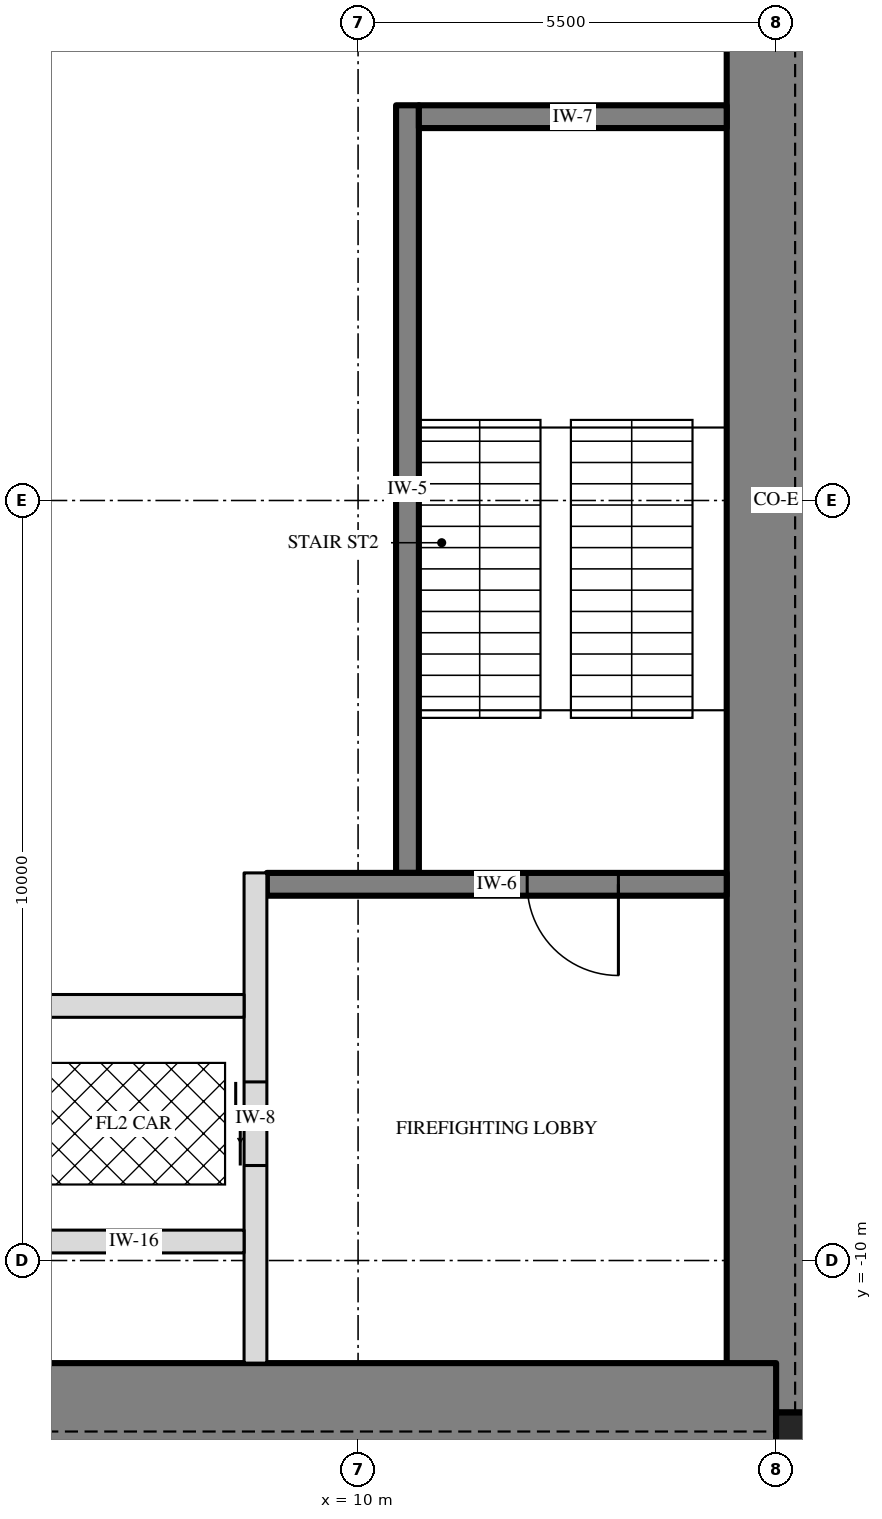
"""IFC4 building model, lengths in metres.
Left out: names, types, materials, properties, quantities, classifications, styles, units other than length and angle.
Written with IfcOpenShell. Run it as: python <this file> out.ifc"""

import sys

from ifc_helpers import new_model, si_unit, direction, frame, frame_2d, origin, origin_2d, place, context, subcontext, project, spatial, rectangle, extrude, element, fill, save


model = new_model("IFC4")
c1 = context("Model", 3, precision=1e-05, world=origin(), true_north=direction((0.0, 1.0)))
c2 = subcontext(c1, "Body", "Model", "MODEL_VIEW")
j1 = project(units=[si_unit("LENGTHUNIT", "METRE"), si_unit("PLANEANGLEUNIT", "RADIAN")], contexts=[c1])
p1 = place(None, origin())
s1 = spatial("IfcSite", under=j1, at=p1, CompositionType="ELEMENT")
p2 = place(p1, origin())
s2 = spatial("IfcBuilding", under=s1, at=p2, CompositionType="ELEMENT")
p3 = place(p2, frame((0.0, 0.0, 353.25)))
s3 = spatial("IfcBuildingStorey", under=s2, at=p3, CompositionType="ELEMENT", Elevation=353.25)
p4 = place(p3, frame((15.5, -12.0, -0.3), z_axis=(0.0, 0.0, 1.0), x_axis=(0.0, 1.0, 0.0)))
e1 = element("IfcWall", 1, at=p4, inside=s3, PredefinedType="SHEAR", context=c2, shape_type="SweptSolid", body=[
    extrude(rectangle(XDim=24.0, YDim=1.3, at=frame_2d((12.0, 0.0))), origin(), (0.0, 0.0, 1.0), 5.0),
])
p5 = place(p4, frame((2.675, 0.0, 0.3)))
e2 = element("IfcOpeningElement", 2, at=p5, cuts=e1, PredefinedType="OPENING", context=c2, shape_type="SweptSolid", body=[
    extrude(rectangle(XDim=1.2, YDim=2.1, at=frame_2d((0.6, 1.05))), frame((0.0, 0.66, 0.0), z_axis=(0.0, -1.0, 0.0), x_axis=(1.0, 0.0, 0.0)), (0.0, 0.0, 1.0), 1.32),
])
p6 = place(p4, frame((20.125, 0.0, 0.3)))
e3 = element("IfcOpeningElement", 3, at=p6, cuts=e1, PredefinedType="OPENING", context=c2, shape_type="SweptSolid", body=[
    extrude(rectangle(XDim=1.8, YDim=2.1, at=frame_2d((0.9, 1.05))), frame((0.0, 0.66, 0.0), z_axis=(0.0, -1.0, 0.0), x_axis=(1.0, 0.0, 0.0)), (0.0, 0.0, 1.0), 1.32),
])
p7 = place(p3, frame((-15.5, -12.0, -0.3), z_axis=(0.0, 0.0, 1.0), x_axis=(1.0, 0.0, 0.0)))
e4 = element("IfcWall", 4, at=p7, inside=s3, PredefinedType="SHEAR", context=c2, shape_type="SweptSolid", body=[
    extrude(rectangle(XDim=31.0, YDim=1.3, at=frame_2d((15.5, 0.0))), origin(), (0.0, 0.0, 1.0), 5.0),
])
p8 = place(p3, frame((15.825, -12.325, -0.3), z_axis=(0.0, 0.0, 1.0), x_axis=(1.0, 0.0, 0.0)))
e5 = element("IfcColumn", 5, at=p8, inside=s3, PredefinedType="COLUMN", context=c2, shape_type="SweptSolid", body=[
    extrude(rectangle(XDim=0.65, YDim=0.65, at=origin_2d()), origin(), (0.0, 0.0, 1.0), 5.0),
])
p9 = place(p3, frame((10.65, -4.9, 0.0), z_axis=(0.0, 0.0, 1.0), x_axis=(0.0, 1.0, 0.0)))
e6 = element("IfcWall", 6, at=p9, inside=s3, PredefinedType="SOLIDWALL", context=c2, shape_type="SweptSolid", body=[
    extrude(rectangle(XDim=10.1, YDim=0.3, at=frame_2d((5.05, 0.0))), origin(), (0.0, 0.0, 1.0), 4.7),
])
p10 = place(p3, frame((14.85, -5.05, 0.0), z_axis=(0.0, 0.0, 1.0), x_axis=(-1.0, 0.0, 0.0)))
e7 = element("IfcWall", 7, at=p10, inside=s3, PredefinedType="SOLIDWALL", context=c2, shape_type="SweptSolid", body=[
    extrude(rectangle(XDim=6.05, YDim=0.3, at=frame_2d((3.025, 0.0))), origin(), (0.0, 0.0, 1.0), 4.7),
])
p11 = place(p10, frame((1.425, 0.0, 0.0)))
e8 = element("IfcOpeningElement", 8, at=p11, cuts=e7, PredefinedType="OPENING", context=c2, shape_type="SweptSolid", body=[
    extrude(rectangle(XDim=1.2, YDim=2.1, at=frame_2d((0.6, 1.05))), frame((0.0, 0.16, 0.0), z_axis=(0.0, -1.0, 0.0), x_axis=(1.0, 0.0, 0.0)), (0.0, 0.0, 1.0), 0.32),
])
p12 = place(p3, frame((14.85, 5.05, 0.0), z_axis=(0.0, 0.0, 1.0), x_axis=(-1.0, 0.0, 0.0)))
e9 = element("IfcWall", 9, at=p12, inside=s3, PredefinedType="SOLIDWALL", context=c2, shape_type="SweptSolid", body=[
    extrude(rectangle(XDim=4.05, YDim=0.3, at=frame_2d((2.025, 0.0))), origin(), (0.0, 0.0, 1.0), 4.7),
])
p13 = place(p3, frame((8.65, -11.35, 0.0), z_axis=(0.0, 0.0, 1.0), x_axis=(0.0, 1.0, 0.0)))
e10 = element("IfcWall", 10, at=p13, inside=s3, PredefinedType="PARTITIONING", context=c2, shape_type="SweptSolid", body=[
    extrude(rectangle(XDim=6.45, YDim=0.3, at=frame_2d((3.225, 0.0))), origin(), (0.0, 0.0, 1.0), 4.7),
])
p14 = place(p13, frame((2.6, 0.0, 0.0)))
e11 = element("IfcOpeningElement", 11, at=p14, cuts=e10, PredefinedType="OPENING", context=c2, shape_type="SweptSolid", body=[
    extrude(rectangle(XDim=1.1, YDim=2.1, at=frame_2d((0.55, 1.05))), frame((0.0, 0.16, 0.0), z_axis=(0.0, -1.0, 0.0), x_axis=(1.0, 0.0, 0.0)), (0.0, 0.0, 1.0), 0.32),
])
p15 = place(p3, frame((-8.5, -6.65, 0.0), z_axis=(0.0, 0.0, 1.0), x_axis=(1.0, 0.0, 0.0)))
e12 = element("IfcWall", 12, at=p15, inside=s3, PredefinedType="PARTITIONING", context=c2, shape_type="SweptSolid", body=[
    extrude(rectangle(XDim=17.0, YDim=0.3, at=frame_2d((8.5, 0.0))), origin(), (0.0, 0.0, 1.0), 4.7),
])
p16 = place(p15, frame((7.8, 0.0, 0.0)))
e13 = element("IfcOpeningElement", 13, at=p16, cuts=e12, PredefinedType="OPENING", context=c2, shape_type="SweptSolid", body=[
    extrude(rectangle(XDim=1.3, YDim=2.4, at=frame_2d((0.65, 1.2))), frame((0.0, 0.16, 0.0), z_axis=(0.0, -1.0, 0.0), x_axis=(1.0, 0.0, 0.0)), (0.0, 0.0, 1.0), 0.32),
])
p17 = place(p15, frame((5.65, 0.0, 0.0)))
e14 = element("IfcOpeningElement", 14, at=p17, cuts=e12, PredefinedType="OPENING", context=c2, shape_type="SweptSolid", body=[
    extrude(rectangle(XDim=0.9, YDim=2.1, at=frame_2d((0.45, 1.05))), frame((0.0, 0.16, 0.0), z_axis=(0.0, -1.0, 0.0), x_axis=(1.0, 0.0, 0.0)), (0.0, 0.0, 1.0), 0.32),
])
p18 = place(p15, frame((10.4, 0.0, 0.0)))
e15 = element("IfcOpeningElement", 15, at=p18, cuts=e12, PredefinedType="OPENING", context=c2, shape_type="SweptSolid", body=[
    extrude(rectangle(XDim=0.9, YDim=2.1, at=frame_2d((0.45, 1.05))), frame((0.0, 0.16, 0.0), z_axis=(0.0, -1.0, 0.0), x_axis=(1.0, 0.0, 0.0)), (0.0, 0.0, 1.0), 0.32),
])
p19 = place(p3, frame((5.6, -9.75, 0.0), z_axis=(0.0, 0.0, 1.0), x_axis=(1.0, 0.0, 0.0)))
e16 = element("IfcWall", 16, at=p19, inside=s3, PredefinedType="PARTITIONING", context=c2, shape_type="SweptSolid", body=[
    extrude(rectangle(XDim=2.9, YDim=0.3, at=frame_2d((1.45, 0.0))), origin(), (0.0, 0.0, 1.0), 4.7),
])
p20 = place(p3, frame((-10.65, 2.0, 0.0), z_axis=(0.0, 0.0, 1.0), x_axis=(1.0, 0.0, 0.0)))
e17 = element("IfcWall", 17, at=p20, inside=s3, PredefinedType="PARTITIONING", context=c2, shape_type="SweptSolid", body=[
    extrude(rectangle(XDim=21.3, YDim=0.3, at=frame_2d((10.65, 0.0))), origin(), (0.0, 0.0, 1.0), 4.7),
])
p21 = place(p20, frame((10.05, 0.0, 0.0)))
e18 = element("IfcOpeningElement", 18, at=p21, cuts=e17, PredefinedType="OPENING", context=c2, shape_type="SweptSolid", body=[
    extrude(rectangle(XDim=1.2, YDim=2.1, at=frame_2d((0.6, 1.05))), frame((0.0, 0.16, 0.0), z_axis=(0.0, -1.0, 0.0), x_axis=(1.0, 0.0, 0.0)), (0.0, 0.0, 1.0), 0.32),
])
p22 = place(p20, frame((18.942, 0.0, 0.0)))
e19 = element("IfcOpeningElement", 19, at=p22, cuts=e17, PredefinedType="OPENING", context=c2, shape_type="SweptSolid", body=[
    extrude(rectangle(XDim=0.9, YDim=2.1, at=frame_2d((0.45, 1.05))), frame((0.0, 0.16, 0.0), z_axis=(0.0, -1.0, 0.0), x_axis=(1.0, 0.0, 0.0)), (0.0, 0.0, 1.0), 0.32),
])
p23 = place(p3, frame((6.834, -6.65, 0.0), z_axis=(0.0, 0.0, 1.0), x_axis=(0.0, 1.0, 0.0)))
e20 = element("IfcWall", 20, at=p23, inside=s3, PredefinedType="PARTITIONING", context=c2, shape_type="SweptSolid", body=[
    extrude(rectangle(XDim=8.65, YDim=0.3, at=frame_2d((4.325, 0.0))), origin(), (0.0, 0.0, 1.0), 4.7),
])
p24 = place(p11, origin())
e21 = element("IfcDoor", 21, at=p24, inside=s3, OperationType="SINGLE_SWING_LEFT", PredefinedType="DOOR", context=c2, shape_type="SweptSolid", body=[
    extrude(rectangle(XDim=1.2, YDim=2.1, at=frame_2d((0.6, 1.05))), frame((0.0, 0.025, 0.0), z_axis=(0.0, -1.0, 0.0), x_axis=(1.0, 0.0, 0.0)), (0.0, 0.0, 1.0), 0.05),
])
fill(e8, e21)
p25 = place(p5, origin())
e22 = element("IfcDoor", 22, at=p25, inside=s3, OperationType="SINGLE_SWING_LEFT", PredefinedType="DOOR", context=c2, shape_type="SweptSolid", body=[
    extrude(rectangle(XDim=1.2, YDim=2.1, at=frame_2d((0.6, 1.05))), frame((0.0, 0.025, 0.0), z_axis=(0.0, -1.0, 0.0), x_axis=(1.0, 0.0, 0.0)), (0.0, 0.0, 1.0), 0.05),
])
fill(e2, e22)
p26 = place(p14, origin())
e23 = element("IfcDoor", 23, at=p26, inside=s3, OperationType="DOUBLE_DOOR_SLIDING", PredefinedType="DOOR", context=c2, shape_type="SweptSolid", body=[
    extrude(rectangle(XDim=1.1, YDim=2.1, at=frame_2d((0.55, 1.05))), frame((0.0, 0.025, 0.0), z_axis=(0.0, -1.0, 0.0), x_axis=(1.0, 0.0, 0.0)), (0.0, 0.0, 1.0), 0.05),
])
fill(e11, e23)
p27 = place(p22, origin())
e24 = element("IfcDoor", 24, at=p27, inside=s3, OperationType="SINGLE_SWING_RIGHT", PredefinedType="DOOR", context=c2, shape_type="SweptSolid", body=[
    extrude(rectangle(XDim=0.9, YDim=2.1, at=frame_2d((0.45, 1.05))), frame((0.0, 0.025, 0.0), z_axis=(0.0, -1.0, 0.0), x_axis=(1.0, 0.0, 0.0)), (0.0, 0.0, 1.0), 0.05),
])
fill(e19, e24)
save(model, sys.argv[1])
